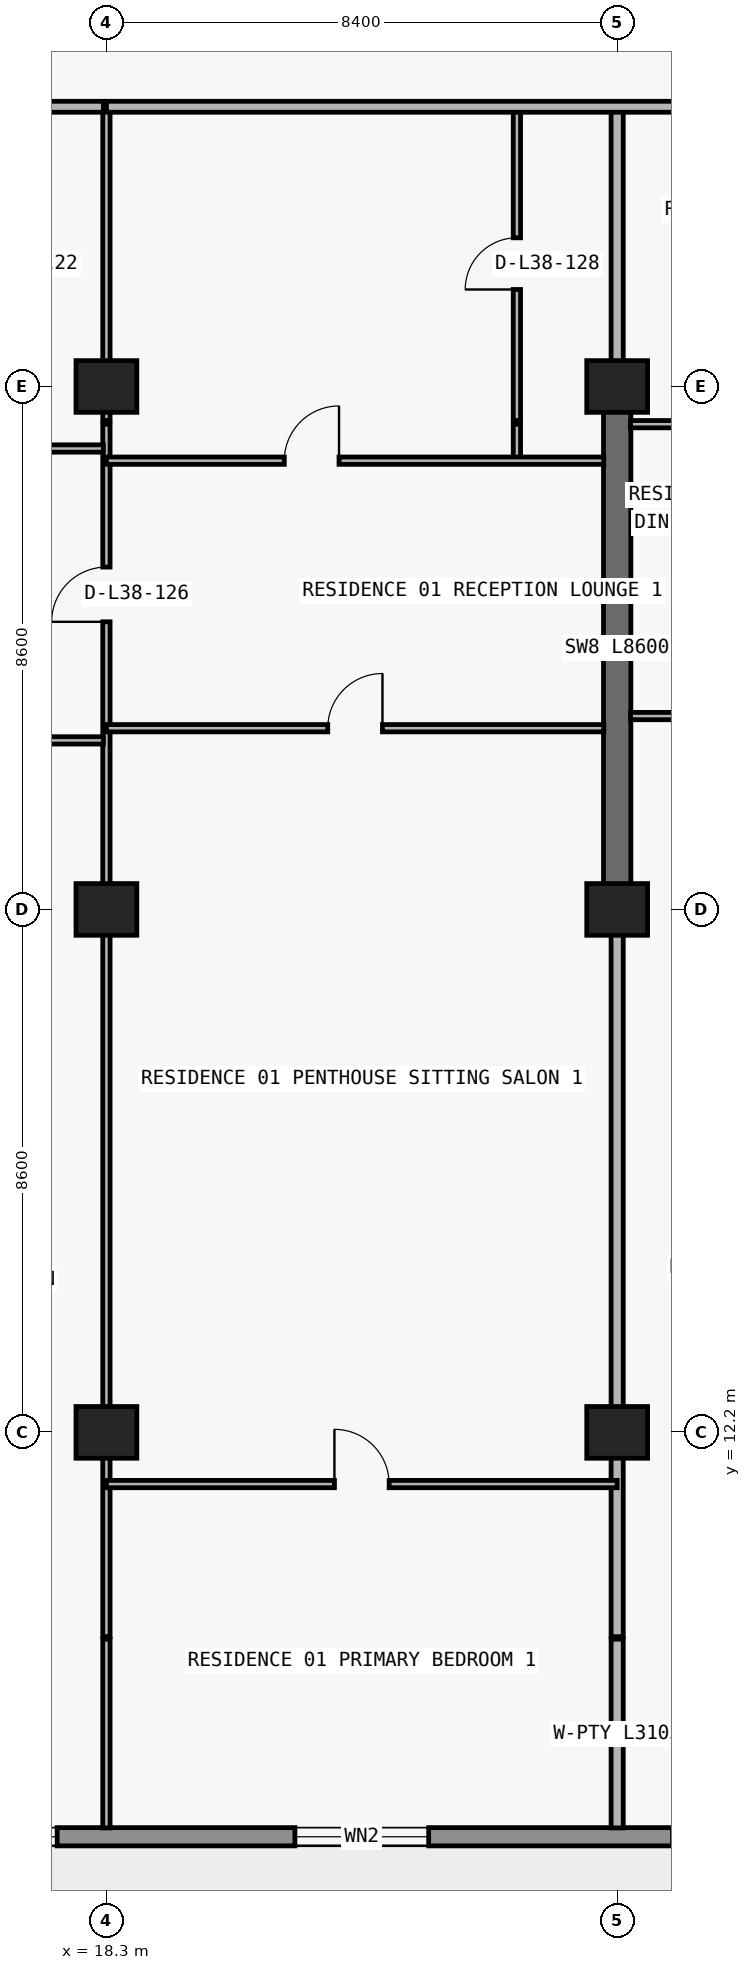
"""IFC4 building model, lengths in metres.
Left out: names, types, materials, properties, quantities, classifications, styles, units other than length and angle.
Written with IfcOpenShell. Run it as: python <this file> out.ifc"""

import sys

from ifc_helpers import new_model, si_unit, direction, frame, frame_2d, origin, origin_2d, place, context, subcontext, project, spatial, rectangle, extrude, element, fill, save


model = new_model("IFC4")
c1 = context("Model", 3, precision=1e-05, world=origin(), true_north=direction((0.0, 1.0)))
c2 = subcontext(c1, "Body", "Model", "MODEL_VIEW")
j1 = project(units=[si_unit("LENGTHUNIT", "METRE"), si_unit("PLANEANGLEUNIT", "RADIAN")], contexts=[c1])
p1 = place(None, origin())
s1 = spatial("IfcSite", under=j1, at=p1, CompositionType="ELEMENT")
p2 = place(p1, origin())
s2 = spatial("IfcBuilding", under=s1, at=p2, CompositionType="ELEMENT")
p3 = place(p2, frame((0.0, 0.0, 138.9)))
s3 = spatial("IfcBuildingStorey", under=s2, at=p3, CompositionType="ELEMENT", Elevation=138.9)
for number, where, z_axis, x_axis in (
    (1, (18.3, 12.2, 0.0), (0.0, 0.0, 1.0), (1.0, 0.0, 0.0)),
    (2, (26.7, 12.2, 0.0), (0.0, 0.0, 1.0), (1.0, 0.0, 0.0)),
    (3, (18.3, 20.8, 0.0), (0.0, 0.0, 1.0), (1.0, 0.0, 0.0)),
    (4, (26.7, 20.8, 0.0), (0.0, 0.0, 1.0), (1.0, 0.0, 0.0)),
    (5, (18.3, 29.4, 0.0), (0.0, 0.0, 1.0), (1.0, 0.0, 0.0)),
    (6, (26.7, 29.4, 0.0), (0.0, 0.0, 1.0), (1.0, 0.0, 0.0)),
):
    element("IfcColumn", number, at=place(p3, frame(where, z_axis=z_axis, x_axis=x_axis)), inside=s3, PredefinedType="COLUMN", context=c2, shape_type="SweptSolid", body=[
        extrude(rectangle(XDim=1.0, YDim=0.85, at=origin_2d()), origin(), (0.0, 0.0, 1.0), 3.05),
    ])
p4 = place(p3, frame((26.7, 20.8, 0.0), z_axis=(0.0, 0.0, 1.0), x_axis=(0.0, 1.0, 0.0)))
e7 = element("IfcWall", 7, at=p4, inside=s3, PredefinedType="SHEAR", context=c2, shape_type="SweptSolid", body=[
    extrude(rectangle(XDim=8.6, YDim=0.45, at=frame_2d((4.3, 0.0))), origin(), (0.0, 0.0, 1.0), 3.05),
])
p5 = place(p3, frame((70.1, 5.55, 0.0), z_axis=(0.0, 0.0, 1.0), x_axis=(-1.0, 0.0, 0.0)))
e8 = element("IfcWall", 8, at=p5, inside=s3, PredefinedType="STANDARD", context=c2, shape_type="SweptSolid", body=[
    extrude(rectangle(XDim=62.4, YDim=0.3, at=frame_2d((31.2, 0.0))), origin(), (0.0, 0.0, 1.0), 3.05),
])
p6 = place(p5, frame((57.29, 0.0, 0.0)))
e9 = element("IfcOpeningElement", 9, at=p6, cuts=e8, PredefinedType="OPENING", context=c2, shape_type="SweptSolid", body=[
    extrude(rectangle(XDim=2.0, YDim=2.3, at=frame_2d((1.0, 1.15))), frame((0.0, 0.16, 0.0), z_axis=(0.0, -1.0, 0.0), x_axis=(1.0, 0.0, 0.0)), (0.0, 0.0, 1.0), 0.32),
])
p7 = place(p5, frame((52.61, 0.0, 0.65)))
e10 = element("IfcOpeningElement", 10, at=p7, cuts=e8, PredefinedType="OPENING", context=c2, shape_type="SweptSolid", body=[
    extrude(rectangle(XDim=2.6, YDim=1.85, at=frame_2d((1.3, 0.925))), frame((0.0, 0.16, 0.0), z_axis=(0.0, -1.0, 0.0), x_axis=(1.0, 0.0, 0.0)), (0.0, 0.0, 1.0), 0.32),
])
p8 = place(p5, frame((46.5, 0.0, 0.85)))
e11 = element("IfcOpeningElement", 11, at=p8, cuts=e8, PredefinedType="OPENING", context=c2, shape_type="SweptSolid", body=[
    extrude(rectangle(XDim=2.2, YDim=1.55, at=frame_2d((1.1, 0.775))), frame((0.0, 0.16, 0.0), z_axis=(0.0, -1.0, 0.0), x_axis=(1.0, 0.0, 0.0)), (0.0, 0.0, 1.0), 0.32),
])
p9 = place(p5, frame((40.49, 0.0, 0.0)))
e12 = element("IfcOpeningElement", 12, at=p9, cuts=e8, PredefinedType="OPENING", context=c2, shape_type="SweptSolid", body=[
    extrude(rectangle(XDim=2.0, YDim=2.3, at=frame_2d((1.0, 1.15))), frame((0.0, 0.16, 0.0), z_axis=(0.0, -1.0, 0.0), x_axis=(1.0, 0.0, 0.0)), (0.0, 0.0, 1.0), 0.32),
])
p10 = place(p5, frame((35.81, 0.0, 0.65)))
e13 = element("IfcOpeningElement", 13, at=p10, cuts=e8, PredefinedType="OPENING", context=c2, shape_type="SweptSolid", body=[
    extrude(rectangle(XDim=2.6, YDim=1.85, at=frame_2d((1.3, 0.925))), frame((0.0, 0.16, 0.0), z_axis=(0.0, -1.0, 0.0), x_axis=(1.0, 0.0, 0.0)), (0.0, 0.0, 1.0), 0.32),
])
p11 = place(p5, frame((30.1, 0.0, 0.85)))
e14 = element("IfcOpeningElement", 14, at=p11, cuts=e8, PredefinedType="OPENING", context=c2, shape_type="SweptSolid", body=[
    extrude(rectangle(XDim=2.2, YDim=1.55, at=frame_2d((1.1, 0.775))), frame((0.0, 0.16, 0.0), z_axis=(0.0, -1.0, 0.0), x_axis=(1.0, 0.0, 0.0)), (0.0, 0.0, 1.0), 0.32),
])
p12 = place(p5, frame((22.1, 0.0, 0.85)))
e15 = element("IfcOpeningElement", 15, at=p12, cuts=e8, PredefinedType="OPENING", context=c2, shape_type="SweptSolid", body=[
    extrude(rectangle(XDim=2.2, YDim=1.55, at=frame_2d((1.1, 0.775))), frame((0.0, 0.16, 0.0), z_axis=(0.0, -1.0, 0.0), x_axis=(1.0, 0.0, 0.0)), (0.0, 0.0, 1.0), 0.32),
])
p13 = place(p5, frame((16.026, 0.0, 0.0)))
e16 = element("IfcOpeningElement", 16, at=p13, cuts=e8, PredefinedType="OPENING", context=c2, shape_type="SweptSolid", body=[
    extrude(rectangle(XDim=2.0, YDim=2.3, at=frame_2d((1.0, 1.15))), frame((0.0, 0.16, 0.0), z_axis=(0.0, -1.0, 0.0), x_axis=(1.0, 0.0, 0.0)), (0.0, 0.0, 1.0), 0.32),
])
p14 = place(p5, frame((11.726, 0.0, 0.85)))
e17 = element("IfcOpeningElement", 17, at=p14, cuts=e8, PredefinedType="OPENING", context=c2, shape_type="SweptSolid", body=[
    extrude(rectangle(XDim=2.2, YDim=1.55, at=frame_2d((1.1, 0.775))), frame((0.0, 0.16, 0.0), z_axis=(0.0, -1.0, 0.0), x_axis=(1.0, 0.0, 0.0)), (0.0, 0.0, 1.0), 0.32),
])
p15 = place(p5, frame((7.29, 0.0, 0.0)))
e18 = element("IfcOpeningElement", 18, at=p15, cuts=e8, PredefinedType="OPENING", context=c2, shape_type="SweptSolid", body=[
    extrude(rectangle(XDim=2.0, YDim=2.3, at=frame_2d((1.0, 1.15))), frame((0.0, 0.16, 0.0), z_axis=(0.0, -1.0, 0.0), x_axis=(1.0, 0.0, 0.0)), (0.0, 0.0, 1.0), 0.32),
])
p16 = place(p5, frame((3.19, 0.0, 0.85)))
e19 = element("IfcOpeningElement", 19, at=p16, cuts=e8, PredefinedType="OPENING", context=c2, shape_type="SweptSolid", body=[
    extrude(rectangle(XDim=1.8, YDim=1.55, at=frame_2d((0.9, 0.775))), frame((0.0, 0.16, 0.0), z_axis=(0.0, -1.0, 0.0), x_axis=(1.0, 0.0, 0.0)), (0.0, 0.0, 1.0), 0.32),
])
p17 = place(p3, frame((18.3, 5.695, 0.0), z_axis=(0.0, 0.0, 1.0), x_axis=(0.0, 1.0, 0.0)))
e20 = element("IfcWall", 20, at=p17, inside=s3, PredefinedType="PARTITIONING", context=c2, shape_type="SweptSolid", body=[
    extrude(rectangle(XDim=3.105, YDim=0.12, at=frame_2d((1.552, 0.0))), origin(), (0.0, 0.0, 1.0), 3.05),
])
p18 = place(p3, frame((18.3, 8.84, 0.0), z_axis=(0.0, 0.0, 1.0), x_axis=(0.0, 1.0, 0.0)))
e21 = element("IfcWall", 21, at=p18, inside=s3, PredefinedType="PARTITIONING", context=c2, shape_type="SweptSolid", body=[
    extrude(rectangle(XDim=19.94, YDim=0.12, at=frame_2d((9.97, 0.0))), origin(), (0.0, 0.0, 1.0), 2.174),
])
p19 = place(p18, frame((16.69, 0.0, 0.0)))
e22 = element("IfcOpeningElement", 22, at=p19, cuts=e21, PredefinedType="OPENING", context=c2, shape_type="SweptSolid", body=[
    extrude(rectangle(XDim=0.9, YDim=2.124, at=frame_2d((0.45, 1.062))), frame((0.0, 0.07, 0.0), z_axis=(0.0, -1.0, 0.0), x_axis=(1.0, 0.0, 0.0)), (0.0, 0.0, 1.0), 0.14),
])
p20 = place(p3, frame((18.3, 28.84, 0.0), z_axis=(0.0, 0.0, 1.0), x_axis=(0.0, 1.0, 0.0)))
e23 = element("IfcWall", 23, at=p20, inside=s3, PredefinedType="PARTITIONING", context=c2, shape_type="SweptSolid", body=[
    extrude(rectangle(XDim=5.16, YDim=0.12, at=frame_2d((2.58, 0.0))), origin(), (0.0, 0.0, 1.0), 2.174),
])
p21 = place(p3, frame((25.051, 28.18, 0.0), z_axis=(0.0, 0.0, 1.0), x_axis=(0.0, 1.0, 0.0)))
e24 = element("IfcWall", 24, at=p21, inside=s3, PredefinedType="PARTITIONING", context=c2, shape_type="SweptSolid", body=[
    extrude(rectangle(XDim=0.6, YDim=0.12, at=frame_2d((0.3, 0.0))), origin(), (0.0, 0.0, 1.0), 3.05),
])
p22 = place(p3, frame((25.051, 28.84, 0.0), z_axis=(0.0, 0.0, 1.0), x_axis=(0.0, 1.0, 0.0)))
e25 = element("IfcWall", 25, at=p22, inside=s3, PredefinedType="PARTITIONING", context=c2, shape_type="SweptSolid", body=[
    extrude(rectangle(XDim=5.16, YDim=0.12, at=frame_2d((2.58, 0.0))), origin(), (0.0, 0.0, 1.0), 3.05),
])
p23 = place(p22, frame((2.155, 0.0, 0.0)))
e26 = element("IfcOpeningElement", 26, at=p23, cuts=e25, PredefinedType="OPENING", context=c2, shape_type="SweptSolid", body=[
    extrude(rectangle(XDim=0.85, YDim=2.1, at=frame_2d((0.425, 1.05))), frame((0.0, 0.07, 0.0), z_axis=(0.0, -1.0, 0.0), x_axis=(1.0, 0.0, 0.0)), (0.0, 0.0, 1.0), 0.14),
])
p24 = place(p3, frame((26.7, 5.695, 0.0), z_axis=(0.0, 0.0, 1.0), x_axis=(0.0, 1.0, 0.0)))
e27 = element("IfcWall", 27, at=p24, inside=s3, PredefinedType="PARTITIONING", context=c2, shape_type="SweptSolid", body=[
    extrude(rectangle(XDim=3.105, YDim=0.2, at=frame_2d((1.552, 0.0))), origin(), (0.0, 0.0, 1.0), 3.05),
])
p25 = place(p3, frame((26.7, 8.84, 0.0), z_axis=(0.0, 0.0, 1.0), x_axis=(0.0, 1.0, 0.0)))
e28 = element("IfcWall", 28, at=p25, inside=s3, PredefinedType="PARTITIONING", context=c2, shape_type="SweptSolid", body=[
    extrude(rectangle(XDim=11.955, YDim=0.2, at=frame_2d((5.978, 0.0))), origin(), (0.0, 0.0, 1.0), 2.174),
])
p26 = place(p3, frame((26.7, 29.405, 0.0), z_axis=(0.0, 0.0, 1.0), x_axis=(0.0, 1.0, 0.0)))
e29 = element("IfcWall", 29, at=p26, inside=s3, PredefinedType="PARTITIONING", context=c2, shape_type="SweptSolid", body=[
    extrude(rectangle(XDim=4.595, YDim=0.2, at=frame_2d((2.297, 0.0))), origin(), (0.0, 0.0, 1.0), 2.335),
])
p27 = place(p3, frame((18.3, 11.35, 0.0), z_axis=(0.0, 0.0, 1.0), x_axis=(1.0, 0.0, 0.0)))
e30 = element("IfcWall", 30, at=p27, inside=s3, PredefinedType="PARTITIONING", context=c2, shape_type="SweptSolid", body=[
    extrude(rectangle(XDim=8.4, YDim=0.12, at=frame_2d((4.2, 0.0))), origin(), (0.0, 0.0, 1.0), 3.05),
])
p28 = place(p27, frame((3.75, 0.0, 0.0)))
e31 = element("IfcOpeningElement", 31, at=p28, cuts=e30, PredefinedType="OPENING", context=c2, shape_type="SweptSolid", body=[
    extrude(rectangle(XDim=0.9, YDim=2.15, at=frame_2d((0.45, 1.075))), frame((0.0, 0.07, 0.0), z_axis=(0.0, -1.0, 0.0), x_axis=(1.0, 0.0, 0.0)), (0.0, 0.0, 1.0), 0.14),
])
p29 = place(p3, frame((9.9, 23.58, 0.0), z_axis=(0.0, 0.0, 1.0), x_axis=(1.0, 0.0, 0.0)))
e32 = element("IfcWall", 32, at=p29, inside=s3, PredefinedType="PARTITIONING", context=c2, shape_type="SweptSolid", body=[
    extrude(rectangle(XDim=8.35, YDim=0.12, at=frame_2d((4.175, 0.0))), origin(), (0.0, 0.0, 1.0), 3.05),
])
p30 = place(p29, frame((1.44, 0.0, 0.0)))
e33 = element("IfcOpeningElement", 33, at=p30, cuts=e32, PredefinedType="OPENING", context=c2, shape_type="SweptSolid", body=[
    extrude(rectangle(XDim=0.9, YDim=2.15, at=frame_2d((0.45, 1.075))), frame((0.0, 0.07, 0.0), z_axis=(0.0, -1.0, 0.0), x_axis=(1.0, 0.0, 0.0)), (0.0, 0.0, 1.0), 0.14),
])
p31 = place(p3, frame((18.3, 23.78, 0.0), z_axis=(0.0, 0.0, 1.0), x_axis=(1.0, 0.0, 0.0)))
e34 = element("IfcWall", 34, at=p31, inside=s3, PredefinedType="PARTITIONING", context=c2, shape_type="SweptSolid", body=[
    extrude(rectangle(XDim=8.18, YDim=0.12, at=frame_2d((4.09, 0.0))), origin(), (0.0, 0.0, 1.0), 3.05),
])
p32 = place(p31, frame((3.64, 0.0, 0.0)))
e35 = element("IfcOpeningElement", 35, at=p32, cuts=e34, PredefinedType="OPENING", context=c2, shape_type="SweptSolid", body=[
    extrude(rectangle(XDim=0.9, YDim=2.15, at=frame_2d((0.45, 1.075))), frame((0.0, 0.07, 0.0), z_axis=(0.0, -1.0, 0.0), x_axis=(1.0, 0.0, 0.0)), (0.0, 0.0, 1.0), 0.14),
])
p33 = place(p3, frame((26.92, 23.98, 0.0), z_axis=(0.0, 0.0, 1.0), x_axis=(1.0, 0.0, 0.0)))
e36 = element("IfcWall", 36, at=p33, inside=s3, PredefinedType="PARTITIONING", context=c2, shape_type="SweptSolid", body=[
    extrude(rectangle(XDim=8.18, YDim=0.12, at=frame_2d((4.09, 0.0))), origin(), (0.0, 0.0, 1.0), 3.05),
])
p34 = place(p33, frame((1.204, 0.0, 0.0)))
e37 = element("IfcOpeningElement", 37, at=p34, cuts=e36, PredefinedType="OPENING", context=c2, shape_type="SweptSolid", body=[
    extrude(rectangle(XDim=0.9, YDim=2.15, at=frame_2d((0.45, 1.075))), frame((0.0, 0.07, 0.0), z_axis=(0.0, -1.0, 0.0), x_axis=(1.0, 0.0, 0.0)), (0.0, 0.0, 1.0), 0.14),
])
p35 = place(p3, frame((18.3, 28.18, 0.0), z_axis=(0.0, 0.0, 1.0), x_axis=(1.0, 0.0, 0.0)))
e38 = element("IfcWall", 38, at=p35, inside=s3, PredefinedType="PARTITIONING", context=c2, shape_type="SweptSolid", body=[
    extrude(rectangle(XDim=8.18, YDim=0.12, at=frame_2d((4.09, 0.0))), origin(), (0.0, 0.0, 1.0), 3.05),
])
p36 = place(p35, frame((2.926, 0.0, 0.0)))
e39 = element("IfcOpeningElement", 39, at=p36, cuts=e38, PredefinedType="OPENING", context=c2, shape_type="SweptSolid", body=[
    extrude(rectangle(XDim=0.9, YDim=2.15, at=frame_2d((0.45, 1.075))), frame((0.0, 0.07, 0.0), z_axis=(0.0, -1.0, 0.0), x_axis=(1.0, 0.0, 0.0)), (0.0, 0.0, 1.0), 0.14),
])
p37 = place(p3, frame((9.9, 28.38, 0.0), z_axis=(0.0, 0.0, 1.0), x_axis=(1.0, 0.0, 0.0)))
e40 = element("IfcWall", 40, at=p37, inside=s3, PredefinedType="PARTITIONING", context=c2, shape_type="SweptSolid", body=[
    extrude(rectangle(XDim=8.35, YDim=0.12, at=frame_2d((4.175, 0.0))), origin(), (0.0, 0.0, 1.0), 3.05),
])
p38 = place(p37, frame((1.44, 0.0, 0.0)))
e41 = element("IfcOpeningElement", 41, at=p38, cuts=e40, PredefinedType="OPENING", context=c2, shape_type="SweptSolid", body=[
    extrude(rectangle(XDim=0.9, YDim=2.15, at=frame_2d((0.45, 1.075))), frame((0.0, 0.07, 0.0), z_axis=(0.0, -1.0, 0.0), x_axis=(1.0, 0.0, 0.0)), (0.0, 0.0, 1.0), 0.14),
])
p39 = place(p3, frame((26.92, 28.78, 0.0), z_axis=(0.0, 0.0, 1.0), x_axis=(1.0, 0.0, 0.0)))
e42 = element("IfcWall", 42, at=p39, inside=s3, PredefinedType="PARTITIONING", context=c2, shape_type="SweptSolid", body=[
    extrude(rectangle(XDim=8.18, YDim=0.12, at=frame_2d((4.09, 0.0))), origin(), (0.0, 0.0, 1.0), 3.05),
])
p40 = place(p39, frame((1.204, 0.0, 0.0)))
e43 = element("IfcOpeningElement", 43, at=p40, cuts=e42, PredefinedType="OPENING", context=c2, shape_type="SweptSolid", body=[
    extrude(rectangle(XDim=0.9, YDim=2.15, at=frame_2d((0.45, 1.075))), frame((0.0, 0.07, 0.0), z_axis=(0.0, -1.0, 0.0), x_axis=(1.0, 0.0, 0.0)), (0.0, 0.0, 1.0), 0.14),
])
p41 = place(p3, frame((7.705, 34.0, 0.0), z_axis=(0.0, 0.0, 1.0), x_axis=(1.0, 0.0, 0.0)))
e44 = element("IfcWall", 44, at=p41, inside=s3, PredefinedType="PARTITIONING", context=c2, shape_type="SweptSolid", body=[
    extrude(rectangle(XDim=10.545, YDim=0.18, at=frame_2d((5.272, 0.0))), origin(), (0.0, 0.0, 1.0), 3.05),
])
p42 = place(p41, frame((4.979, 0.0, 0.0)))
e45 = element("IfcOpeningElement", 45, at=p42, cuts=e44, PredefinedType="OPENING", context=c2, shape_type="SweptSolid", body=[
    extrude(rectangle(XDim=1.0, YDim=2.2, at=frame_2d((0.5, 1.1))), frame((0.0, 0.1, 0.0), z_axis=(0.0, -1.0, 0.0), x_axis=(1.0, 0.0, 0.0)), (0.0, 0.0, 1.0), 0.2),
])
p43 = place(p3, frame((18.3, 34.0, 0.0), z_axis=(0.0, 0.0, 1.0), x_axis=(1.0, 0.0, 0.0)))
e46 = element("IfcWall", 46, at=p43, inside=s3, PredefinedType="PARTITIONING", context=c2, shape_type="SweptSolid", body=[
    extrude(rectangle(XDim=37.586, YDim=0.18, at=frame_2d((18.793, 0.0))), origin(), (0.0, 0.0, 1.0), 3.05),
])
p44 = place(p43, frame((11.162, 0.0, 0.0)))
e47 = element("IfcOpeningElement", 47, at=p44, cuts=e46, PredefinedType="OPENING", context=c2, shape_type="SweptSolid", body=[
    extrude(rectangle(XDim=1.0, YDim=2.2, at=frame_2d((0.5, 1.1))), frame((0.0, 0.1, 0.0), z_axis=(0.0, -1.0, 0.0), x_axis=(1.0, 0.0, 0.0)), (0.0, 0.0, 1.0), 0.2),
])
p45 = place(p43, frame((34.693, 0.0, 0.0)))
e48 = element("IfcOpeningElement", 48, at=p45, cuts=e46, PredefinedType="OPENING", context=c2, shape_type="SweptSolid", body=[
    extrude(rectangle(XDim=1.0, YDim=2.2, at=frame_2d((0.5, 1.1))), frame((0.0, 0.1, 0.0), z_axis=(0.0, -1.0, 0.0), x_axis=(1.0, 0.0, 0.0)), (0.0, 0.0, 1.0), 0.2),
])
p46 = place(p7, origin())
e49 = element("IfcWindow", 49, at=p46, inside=s3, PartitioningType="SINGLE_PANEL", PredefinedType="WINDOW", context=c2, shape_type="SweptSolid", body=[
    extrude(rectangle(XDim=2.6, YDim=1.85, at=frame_2d((1.3, 0.925))), frame((0.0, 0.03, 0.0), z_axis=(0.0, -1.0, 0.0), x_axis=(1.0, 0.0, 0.0)), (0.0, 0.0, 1.0), 0.06),
])
fill(e10, e49)
p47 = place(p8, origin())
e50 = element("IfcWindow", 50, at=p47, inside=s3, PartitioningType="SINGLE_PANEL", PredefinedType="WINDOW", context=c2, shape_type="SweptSolid", body=[
    extrude(rectangle(XDim=2.2, YDim=1.55, at=frame_2d((1.1, 0.775))), frame((0.0, 0.03, 0.0), z_axis=(0.0, -1.0, 0.0), x_axis=(1.0, 0.0, 0.0)), (0.0, 0.0, 1.0), 0.06),
])
fill(e11, e50)
p48 = place(p19, origin())
e51 = element("IfcDoor", 51, at=p48, inside=s3, OperationType="SINGLE_SWING_LEFT", PredefinedType="DOOR", context=c2, shape_type="SweptSolid", body=[
    extrude(rectangle(XDim=0.9, YDim=2.124, at=frame_2d((0.45, 1.062))), frame((0.0, 0.025, 0.0), z_axis=(0.0, -1.0, 0.0), x_axis=(1.0, 0.0, 0.0)), (0.0, 0.0, 1.0), 0.05),
])
fill(e22, e51)
p49 = place(p36, origin())
e52 = element("IfcDoor", 52, at=p49, inside=s3, OperationType="SINGLE_SWING_RIGHT", PredefinedType="DOOR", context=c2, shape_type="SweptSolid", body=[
    extrude(rectangle(XDim=0.9, YDim=2.15, at=frame_2d((0.45, 1.075))), frame((0.0, 0.025, 0.0), z_axis=(0.0, -1.0, 0.0), x_axis=(1.0, 0.0, 0.0)), (0.0, 0.0, 1.0), 0.05),
])
fill(e39, e52)
p50 = place(p23, origin())
e53 = element("IfcDoor", 53, at=p50, inside=s3, OperationType="SINGLE_SWING_LEFT", PredefinedType="DOOR", context=c2, shape_type="SweptSolid", body=[
    extrude(rectangle(XDim=0.85, YDim=2.1, at=frame_2d((0.425, 1.05))), frame((0.0, 0.025, 0.0), z_axis=(0.0, -1.0, 0.0), x_axis=(1.0, 0.0, 0.0)), (0.0, 0.0, 1.0), 0.05),
])
fill(e26, e53)
p51 = place(p32, origin())
e54 = element("IfcDoor", 54, at=p51, inside=s3, OperationType="SINGLE_SWING_RIGHT", PredefinedType="DOOR", context=c2, shape_type="SweptSolid", body=[
    extrude(rectangle(XDim=0.9, YDim=2.15, at=frame_2d((0.45, 1.075))), frame((0.0, 0.025, 0.0), z_axis=(0.0, -1.0, 0.0), x_axis=(1.0, 0.0, 0.0)), (0.0, 0.0, 1.0), 0.05),
])
fill(e35, e54)
p52 = place(p28, origin())
e55 = element("IfcDoor", 55, at=p52, inside=s3, OperationType="SINGLE_SWING_LEFT", PredefinedType="DOOR", context=c2, shape_type="SweptSolid", body=[
    extrude(rectangle(XDim=0.9, YDim=2.15, at=frame_2d((0.45, 1.075))), frame((0.0, 0.025, 0.0), z_axis=(0.0, -1.0, 0.0), x_axis=(1.0, 0.0, 0.0)), (0.0, 0.0, 1.0), 0.05),
])
fill(e31, e55)
save(model, sys.argv[1])
